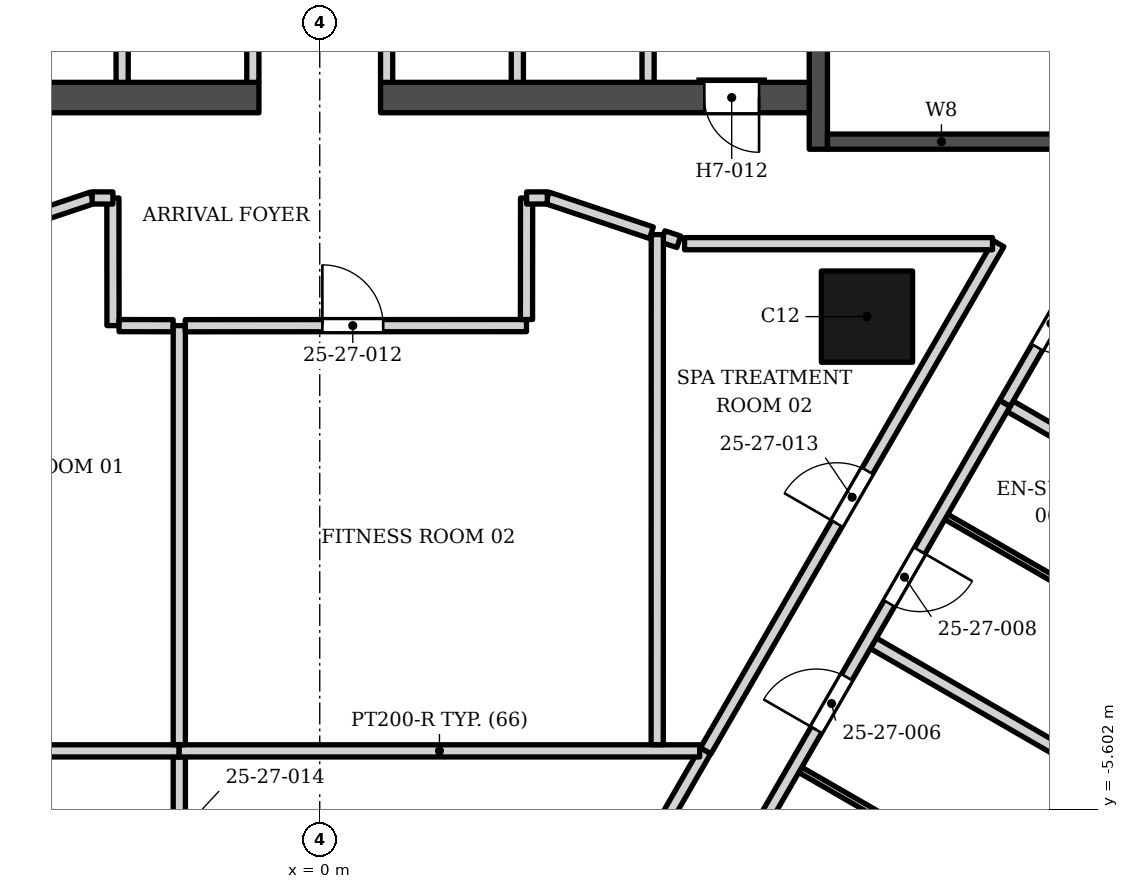
"""IFC4 building model, lengths in metres.
Left out: names, types, materials, properties, quantities, classifications, styles, units other than length and angle.
Written with IfcOpenShell. Run it as: python <this file> out.ifc"""

import sys

from ifc_helpers import new_model, si_unit, direction, frame, frame_2d, origin, origin_2d, place, context, subcontext, project, spatial, rectangle, extrude, element, fill, save


model = new_model("IFC4")
c1 = context("Model", 3, precision=1e-05, world=origin(), true_north=direction((0.0, 1.0)))
c2 = subcontext(c1, "Body", "Model", "MODEL_VIEW")
j1 = project(units=[si_unit("LENGTHUNIT", "METRE"), si_unit("PLANEANGLEUNIT", "RADIAN")], contexts=[c1])
p1 = place(None, origin())
s1 = spatial("IfcSite", under=j1, at=p1, CompositionType="ELEMENT")
p2 = place(p1, origin())
s2 = spatial("IfcBuilding", under=s1, at=p2, CompositionType="ELEMENT")
p3 = place(p2, frame((0.0, 0.0, 112.2)))
s3 = spatial("IfcBuildingStorey", under=s2, at=p3, CompositionType="ELEMENT", Elevation=112.2)
p4 = place(p3, frame((8.2, 5.253, 0.0), z_axis=(0.0, 0.0, 1.0), x_axis=(0.0, 1.0, 0.0)))
e1 = element("IfcWall", 1, at=p4, inside=s3, PredefinedType="SHEAR", context=c2, shape_type="SweptSolid", body=[
    extrude(rectangle(XDim=13.3, YDim=0.3, at=frame_2d((6.65, 0.0))), origin(), (0.0, 0.0, 1.0), 3.4),
])
p5 = place(p4, frame((7.1, 0.0, 0.0)))
e2 = element("IfcOpeningElement", 2, at=p5, cuts=e1, PredefinedType="OPENING", context=c2, shape_type="SweptSolid", body=[
    extrude(rectangle(XDim=1.4, YDim=2.1, at=frame_2d((0.7, 1.05))), frame((0.0, 0.16, 0.0), z_axis=(0.0, -1.0, 0.0), x_axis=(1.0, 0.0, 0.0)), (0.0, 0.0, 1.0), 0.32),
])
p6 = place(p4, frame((5.05, 0.0, 0.0)))
e3 = element("IfcOpeningElement", 3, at=p6, cuts=e1, PredefinedType="OPENING", context=c2, shape_type="SweptSolid", body=[
    extrude(rectangle(XDim=1.4, YDim=2.1, at=frame_2d((0.7, 1.05))), frame((0.0, 0.16, 0.0), z_axis=(0.0, -1.0, 0.0), x_axis=(1.0, 0.0, 0.0)), (0.0, 0.0, 1.0), 0.32),
])
p7 = place(p3, frame((8.35, 5.378, 0.0), z_axis=(0.0, 0.0, 1.0), x_axis=(1.0, 0.0, 0.0)))
e4 = element("IfcWall", 4, at=p7, inside=s3, PredefinedType="SHEAR", context=c2, shape_type="SweptSolid", body=[
    extrude(rectangle(XDim=3.75, YDim=0.25, at=frame_2d((1.875, 0.0))), origin(), (0.0, 0.0, 1.0), 3.4),
])
p8 = place(p3, frame((-8.05, 6.103, 0.0), z_axis=(0.0, 0.0, 1.0), x_axis=(1.0, 0.0, 0.0)))
e5 = element("IfcWall", 5, at=p8, inside=s3, PredefinedType="SHEAR", context=c2, shape_type="SweptSolid", body=[
    extrude(rectangle(XDim=7.05, YDim=0.5, at=frame_2d((3.525, 0.0))), origin(), (0.0, 0.0, 1.0), 3.4),
])
p9 = place(p8, frame((0.825, 0.0, 0.0)))
e6 = element("IfcOpeningElement", 6, at=p9, cuts=e5, PredefinedType="OPENING", context=c2, shape_type="SweptSolid", body=[
    extrude(rectangle(XDim=0.9, YDim=2.1, at=frame_2d((0.45, 1.05))), frame((0.0, 0.26, 0.0), z_axis=(0.0, -1.0, 0.0), x_axis=(1.0, 0.0, 0.0)), (0.0, 0.0, 1.0), 0.52),
])
p10 = place(p3, frame((1.0, 6.103, 0.0), z_axis=(0.0, 0.0, 1.0), x_axis=(1.0, 0.0, 0.0)))
e7 = element("IfcWall", 7, at=p10, inside=s3, PredefinedType="SHEAR", context=c2, shape_type="SweptSolid", body=[
    extrude(rectangle(XDim=7.05, YDim=0.5, at=frame_2d((3.525, 0.0))), origin(), (0.0, 0.0, 1.0), 3.4),
])
p11 = place(p10, frame((5.325, 0.0, 0.0)))
e8 = element("IfcOpeningElement", 8, at=p11, cuts=e7, PredefinedType="OPENING", context=c2, shape_type="SweptSolid", body=[
    extrude(rectangle(XDim=0.9, YDim=2.1, at=frame_2d((0.45, 1.05))), frame((0.0, 0.26, 0.0), z_axis=(0.0, -1.0, 0.0), x_axis=(1.0, 0.0, 0.0)), (0.0, 0.0, 1.0), 0.52),
])
p12 = place(p3, frame((9.0, 2.5, 0.0), z_axis=(0.0, 0.0, 1.0), x_axis=(1.0, 0.0, 0.0)))
e9 = element("IfcColumn", 9, at=p12, inside=s3, PredefinedType="COLUMN", context=c2, shape_type="SweptSolid", body=[
    extrude(rectangle(XDim=1.5, YDim=1.5, at=origin_2d()), origin(), (0.0, 0.0, 1.0), 3.4),
])
for number, where, z_axis, x_axis in (
    (10, (-3.25, 6.353, 0.0), (0.0, 0.0, 1.0), (0.0, 1.0, 0.0)),
    (11, (-1.1, 6.353, 0.0), (0.0, 0.0, 1.0), (0.0, 1.0, 0.0)),
    (12, (1.1, 6.353, 0.0), (0.0, 0.0, 1.0), (0.0, 1.0, 0.0)),
    (13, (3.25, 6.353, 0.0), (0.0, 0.0, 1.0), (0.0, 1.0, 0.0)),
    (14, (5.4, 6.353, 0.0), (0.0, 0.0, 1.0), (0.0, 1.0, 0.0)),
):
    element("IfcWall", number, at=place(p3, frame(where, z_axis=z_axis, x_axis=x_axis)), inside=s3, PredefinedType="SOLIDWALL", context=c2, shape_type="SweptSolid", body=[
        extrude(rectangle(XDim=2.5, YDim=0.2, at=frame_2d((1.25, 0.0))), origin(), (0.0, 0.0, 1.0), 3.23),
    ])
p13 = place(p3, frame((-12.882, 3.644, 0.0), z_axis=(0.0, 0.0, 1.0), x_axis=(0.500000325599, -0.866025215799, 0.0)))
e15 = element("IfcWall", 15, at=p13, inside=s3, PredefinedType="PARTITIONING", context=c2, shape_type="SweptSolid", body=[
    extrude(rectangle(XDim=25.63, YDim=0.2, at=frame_2d((12.815, 0.0))), origin(), (0.0, 0.0, 1.0), 2.384),
])
p14 = place(p13, frame((4.0, 0.0, 0.0)))
e16 = element("IfcOpeningElement", 16, at=p14, cuts=e15, PredefinedType="OPENING", context=c2, shape_type="SweptSolid", body=[
    extrude(rectangle(XDim=1.0, YDim=2.1, at=frame_2d((0.5, 1.05))), frame((0.0, 0.11, 0.0), z_axis=(0.0, -1.0, 0.0), x_axis=(1.0, 0.0, 0.0)), (0.0, 0.0, 1.0), 0.22),
])
p15 = place(p13, frame((14.95, 0.0, 0.0)))
e17 = element("IfcOpeningElement", 17, at=p15, cuts=e15, PredefinedType="OPENING", context=c2, shape_type="SweptSolid", body=[
    extrude(rectangle(XDim=1.6, YDim=2.1, at=frame_2d((0.8, 1.05))), frame((0.0, 0.11, 0.0), z_axis=(0.0, -1.0, 0.0), x_axis=(1.0, 0.0, 0.0)), (0.0, 0.0, 1.0), 0.22),
])
p16 = place(p13, frame((23.515, 0.0, 0.0)))
e18 = element("IfcOpeningElement", 18, at=p16, cuts=e15, PredefinedType="OPENING", context=c2, shape_type="SweptSolid", body=[
    extrude(rectangle(XDim=1.1, YDim=2.1, at=frame_2d((0.55, 1.05))), frame((0.0, 0.11, 0.0), z_axis=(0.0, -1.0, 0.0), x_axis=(1.0, 0.0, 0.0)), (0.0, 0.0, 1.0), 0.22),
])
p17 = place(p3, frame((-0.065, -15.751, 0.0), z_axis=(0.0, 0.0, 1.0), x_axis=(0.499524753178, 0.866299613854, 0.0)))
e19 = element("IfcWall", 19, at=p17, inside=s3, PredefinedType="PARTITIONING", context=c2, shape_type="SweptSolid", body=[
    extrude(rectangle(XDim=12.83, YDim=0.2, at=frame_2d((6.415, 0.0))), origin(), (0.0, 0.0, 1.0), 2.374),
])
p18 = place(p17, frame((7.556, 0.0, 0.0)))
e20 = element("IfcOpeningElement", 20, at=p18, cuts=e19, PredefinedType="OPENING", context=c2, shape_type="SweptSolid", body=[
    extrude(rectangle(XDim=1.0, YDim=2.1, at=frame_2d((0.5, 1.05))), frame((0.0, 0.11, 0.0), z_axis=(0.0, -1.0, 0.0), x_axis=(1.0, 0.0, 0.0)), (0.0, 0.0, 1.0), 0.22),
])
p19 = place(p3, frame((7.902, -4.952, 0.0), z_axis=(0.0, 0.0, 1.0), x_axis=(0.866339109022, -0.499456252518, 0.0)))
e21 = element("IfcWall", 21, at=p19, inside=s3, PredefinedType="PARTITIONING", context=c2, shape_type="SweptSolid", body=[
    extrude(rectangle(XDim=2.7, YDim=0.1, at=frame_2d((1.35, 0.0))), origin(), (0.0, 0.0, 1.0), 2.552),
])
p20 = place(p3, frame((-2.31, -10.667, 0.0), z_axis=(0.0, 0.0, 1.0), x_axis=(0.0, 1.0, 0.0)))
e22 = element("IfcWall", 22, at=p20, inside=s3, PredefinedType="PARTITIONING", context=c2, shape_type="SweptSolid", body=[
    extrude(rectangle(XDim=5.927, YDim=0.2, at=frame_2d((2.963, 0.0))), origin(), (0.0, 0.0, 1.0), 3.23),
])
p21 = place(p3, frame((-6.478, -4.641, 0.0), z_axis=(0.0, 0.0, 1.0), x_axis=(0.499806127846, -0.866137306994, 0.0)))
e23 = element("IfcWall", 23, at=p21, inside=s3, PredefinedType="PARTITIONING", context=c2, shape_type="SweptSolid", body=[
    extrude(rectangle(XDim=8.335, YDim=0.2, at=frame_2d((4.167, 0.0))), origin(), (0.0, 0.0, 1.0), 2.384),
])
p22 = place(p21, frame((3.716, 0.0, 0.0)))
e24 = element("IfcOpeningElement", 24, at=p22, cuts=e23, PredefinedType="OPENING", context=c2, shape_type="SweptSolid", body=[
    extrude(rectangle(XDim=0.9, YDim=2.1, at=frame_2d((0.45, 1.05))), frame((0.0, 0.11, 0.0), z_axis=(0.0, -1.0, 0.0), x_axis=(1.0, 0.0, 0.0)), (0.0, 0.0, 1.0), 0.22),
])
p23 = place(p3, frame((-6.378, -4.641, 0.0), z_axis=(0.0, 0.0, 1.0), x_axis=(1.0, 0.0, 0.0)))
e25 = element("IfcWall", 25, at=p23, inside=s3, PredefinedType="PARTITIONING", context=c2, shape_type="SweptSolid", body=[
    extrude(rectangle(XDim=4.066, YDim=0.2, at=frame_2d((2.033, 0.0))), origin(), (0.0, 0.0, 1.0), 2.384),
])
p24 = place(p3, frame((-2.311, -4.641, 0.0), z_axis=(0.0, 0.0, 1.0), x_axis=(1.0, 0.0, 0.0)))
e26 = element("IfcWall", 26, at=p24, inside=s3, PredefinedType="PARTITIONING", context=c2, shape_type="SweptSolid", body=[
    extrude(rectangle(XDim=8.56, YDim=0.2, at=frame_2d((4.28, 0.0))), origin(), (0.0, 0.0, 1.0), 2.384),
])
p25 = place(p3, frame((6.348, -4.639, 0.0), z_axis=(0.0, 0.0, 1.0), x_axis=(0.500160597015, 0.865932663198, 0.0)))
e27 = element("IfcWall", 27, at=p25, inside=s3, PredefinedType="PARTITIONING", context=c2, shape_type="SweptSolid", body=[
    extrude(rectangle(XDim=9.63, YDim=0.2, at=frame_2d((4.815, 0.0))), origin(), (0.0, 0.0, 1.0), 2.552),
])
p26 = place(p25, frame((4.315, 0.0, 0.0)))
e28 = element("IfcOpeningElement", 28, at=p26, cuts=e27, PredefinedType="OPENING", context=c2, shape_type="SweptSolid", body=[
    extrude(rectangle(XDim=1.0, YDim=2.1, at=frame_2d((0.5, 1.05))), frame((0.0, 0.11, 0.0), z_axis=(0.0, -1.0, 0.0), x_axis=(1.0, 0.0, 0.0)), (0.0, 0.0, 1.0), 0.22),
])
p27 = place(p3, frame((9.104, -2.871, 0.0), z_axis=(0.0, 0.0, 1.0), x_axis=(0.865901871826, -0.500213902613, 0.0)))
e29 = element("IfcWall", 29, at=p27, inside=s3, PredefinedType="PARTITIONING", context=c2, shape_type="SweptSolid", body=[
    extrude(rectangle(XDim=6.45, YDim=0.2, at=frame_2d((3.225, 0.0))), origin(), (0.0, 0.0, 1.0), 2.384),
])
p28 = place(p27, frame((4.25, 0.0, 0.0)))
e30 = element("IfcOpeningElement", 30, at=p28, cuts=e29, PredefinedType="OPENING", context=c2, shape_type="SweptSolid", body=[
    extrude(rectangle(XDim=0.9, YDim=2.1, at=frame_2d((0.45, 1.05))), frame((0.0, 0.11, 0.0), z_axis=(0.0, -1.0, 0.0), x_axis=(1.0, 0.0, 0.0)), (0.0, 0.0, 1.0), 0.22),
])
p29 = place(p3, frame((10.303, -0.792, 0.0), z_axis=(0.0, 0.0, 1.0), x_axis=(0.86571095196, -0.500544251447, 0.0)))
e31 = element("IfcWall", 31, at=p29, inside=s3, PredefinedType="PARTITIONING", context=c2, shape_type="SweptSolid", body=[
    extrude(rectangle(XDim=2.7, YDim=0.1, at=frame_2d((1.35, 0.0))), origin(), (0.0, 0.0, 1.0), 3.23),
])
p30 = place(p3, frame((11.355, 1.025, 0.0), z_axis=(0.0, 0.0, 1.0), x_axis=(0.865748417306, -0.500479448062, 0.0)))
e32 = element("IfcWall", 32, at=p30, inside=s3, PredefinedType="PARTITIONING", context=c2, shape_type="SweptSolid", body=[
    extrude(rectangle(XDim=6.448, YDim=0.2, at=frame_2d((3.224, 0.0))), origin(), (0.0, 0.0, 1.0), 2.384),
])
p31 = place(p3, frame((0.018, -18.412, 0.0), z_axis=(0.0, 0.0, 1.0), x_axis=(0.49999953585, 0.866025671762, 0.0)))
e33 = element("IfcWall", 33, at=p31, inside=s3, PredefinedType="PARTITIONING", context=c2, shape_type="SweptSolid", body=[
    extrude(rectangle(XDim=22.5, YDim=0.2, at=frame_2d((11.25, 0.0))), origin(), (0.0, 0.0, 1.0), 2.374),
])
p32 = place(p31, frame((4.0, 0.0, 0.0)))
e34 = element("IfcOpeningElement", 34, at=p32, cuts=e33, PredefinedType="OPENING", context=c2, shape_type="SweptSolid", body=[
    extrude(rectangle(XDim=1.0, YDim=2.1, at=frame_2d((0.5, 1.05))), frame((0.0, 0.11, 0.0), z_axis=(0.0, -1.0, 0.0), x_axis=(1.0, 0.0, 0.0)), (0.0, 0.0, 1.0), 0.22),
])
p33 = place(p31, frame((9.5, 0.0, 0.0)))
e35 = element("IfcOpeningElement", 35, at=p33, cuts=e33, PredefinedType="OPENING", context=c2, shape_type="SweptSolid", body=[
    extrude(rectangle(XDim=1.1, YDim=2.1, at=frame_2d((0.55, 1.05))), frame((0.0, 0.11, 0.0), z_axis=(0.0, -1.0, 0.0), x_axis=(1.0, 0.0, 0.0)), (0.0, 0.0, 1.0), 0.22),
])
p34 = place(p31, frame((16.3, 0.0, 0.0)))
e36 = element("IfcOpeningElement", 36, at=p34, cuts=e33, PredefinedType="OPENING", context=c2, shape_type="SweptSolid", body=[
    extrude(rectangle(XDim=1.0, YDim=2.1, at=frame_2d((0.5, 1.05))), frame((0.0, 0.11, 0.0), z_axis=(0.0, -1.0, 0.0), x_axis=(1.0, 0.0, 0.0)), (0.0, 0.0, 1.0), 0.22),
])
p35 = place(p31, frame((18.7, 0.0, 0.0)))
e37 = element("IfcOpeningElement", 37, at=p35, cuts=e33, PredefinedType="OPENING", context=c2, shape_type="SweptSolid", body=[
    extrude(rectangle(XDim=1.0, YDim=2.1, at=frame_2d((0.5, 1.05))), frame((0.0, 0.11, 0.0), z_axis=(0.0, -1.0, 0.0), x_axis=(1.0, 0.0, 0.0)), (0.0, 0.0, 1.0), 0.22),
])
p36 = place(p3, frame((-3.402, 4.451, 0.0), z_axis=(0.0, 0.0, 1.0), x_axis=(0.000930881607, -0.99999956673, 0.0)))
e38 = element("IfcWall", 38, at=p36, inside=s3, PredefinedType="PARTITIONING", context=c2, shape_type="SweptSolid", body=[
    extrude(rectangle(XDim=2.098, YDim=0.2, at=frame_2d((1.049, 0.0))), origin(), (0.0, 0.0, 1.0), 3.23),
])
p37 = place(p3, frame((-3.3, 2.352, 0.0), z_axis=(0.0, 0.0, 1.0), x_axis=(0.999998150893, -0.001923073367, 0.0)))
e39 = element("IfcWall", 39, at=p37, inside=s3, PredefinedType="PARTITIONING", context=c2, shape_type="SweptSolid", body=[
    extrude(rectangle(XDim=0.889, YDim=0.2, at=frame_2d((0.444, 0.0))), origin(), (0.0, 0.0, 1.0), 3.23),
])
p38 = place(p3, frame((-2.31, -4.539, 0.0), z_axis=(0.0, 0.0, 1.0), x_axis=(0.0, 1.0, 0.0)))
e40 = element("IfcWall", 40, at=p38, inside=s3, PredefinedType="PARTITIONING", context=c2, shape_type="SweptSolid", body=[
    extrude(rectangle(XDim=6.892, YDim=0.2, at=frame_2d((3.446, 0.0))), origin(), (0.0, 0.0, 1.0), 3.23),
])
p39 = place(p3, frame((-2.211, 2.351, 0.0), z_axis=(0.0, 0.0, 1.0), x_axis=(0.999999953622, 0.00030455968, 0.0)))
e41 = element("IfcWall", 41, at=p39, inside=s3, PredefinedType="PARTITIONING", context=c2, shape_type="SweptSolid", body=[
    extrude(rectangle(XDim=5.611, YDim=0.2, at=frame_2d((2.806, 0.0))), origin(), (0.0, 0.0, 1.0), 3.23),
])
p40 = place(p39, frame((2.255, 0.0, 0.0)))
e42 = element("IfcOpeningElement", 42, at=p40, cuts=e41, PredefinedType="OPENING", context=c2, shape_type="SweptSolid", body=[
    extrude(rectangle(XDim=1.0, YDim=2.1, at=frame_2d((0.5, 1.05))), frame((0.0, 0.11, 0.0), z_axis=(0.0, -1.0, 0.0), x_axis=(1.0, 0.0, 0.0)), (0.0, 0.0, 1.0), 0.22),
])
p41 = place(p3, frame((6.0, 3.7, 0.0), z_axis=(0.0, 0.0, 1.0), x_axis=(1.0, 0.0, 0.0)))
e43 = element("IfcWall", 43, at=p41, inside=s3, PredefinedType="PARTITIONING", context=c2, shape_type="SweptSolid", body=[
    extrude(rectangle(XDim=5.065, YDim=0.2, at=frame_2d((2.532, 0.0))), origin(), (0.0, 0.0, 1.0), 2.832),
])
p42 = place(p3, frame((11.269, 1.075, 0.0), z_axis=(0.0, 0.0, 1.0), x_axis=(0.499554983499, 0.866282181775, 0.0)))
e44 = element("IfcWall", 44, at=p42, inside=s3, PredefinedType="PARTITIONING", context=c2, shape_type="SweptSolid", body=[
    extrude(rectangle(XDim=3.029, YDim=0.2, at=frame_2d((1.515, 0.0))), origin(), (0.0, 0.0, 1.0), 3.23),
])
p43 = place(p42, frame((1.064, 0.0, 0.0)))
e45 = element("IfcOpeningElement", 45, at=p43, cuts=e44, PredefinedType="OPENING", context=c2, shape_type="SweptSolid", body=[
    extrude(rectangle(XDim=0.9, YDim=2.1, at=frame_2d((0.45, 1.05))), frame((0.0, 0.11, 0.0), z_axis=(0.0, -1.0, 0.0), x_axis=(1.0, 0.0, 0.0)), (0.0, 0.0, 1.0), 0.22),
])
p44 = place(p3, frame((5.645, 3.817, 0.0), z_axis=(0.0, 0.0, 1.0), x_axis=(0.950012851822, -0.312210796374, 0.0)))
e46 = element("IfcWall", 46, at=p44, inside=s3, PredefinedType="PARTITIONING", context=c2, shape_type="SweptSolid", body=[
    extrude(rectangle(XDim=0.274, YDim=0.2, at=frame_2d((0.137, 0.0))), origin(), (0.0, 0.0, 1.0), 3.23),
])
p45 = place(p3, frame((5.55, -4.539, 0.0), z_axis=(0.0, 0.0, 1.0), x_axis=(0.000203731187, 0.999999979247, 0.0)))
e47 = element("IfcWall", 47, at=p45, inside=s3, PredefinedType="PARTITIONING", context=c2, shape_type="SweptSolid", body=[
    extrude(rectangle(XDim=8.388, YDim=0.2, at=frame_2d((4.194, 0.0))), origin(), (0.0, 0.0, 1.0), 3.23),
])
p46 = place(p3, frame((3.742, 4.452, 0.0), z_axis=(0.0, 0.0, 1.0), x_axis=(0.948371897829, -0.317160437962, 0.0)))
e48 = element("IfcWall", 48, at=p46, inside=s3, PredefinedType="PARTITIONING", context=c2, shape_type="SweptSolid", body=[
    extrude(rectangle(XDim=1.806, YDim=0.2, at=frame_2d((0.903, 0.0))), origin(), (0.0, 0.0, 1.0), 2.384),
])
p47 = place(p3, frame((-5.905, 3.731, 0.0), z_axis=(0.0, 0.0, 1.0), x_axis=(0.948683298051, 0.316227766017, 0.0)))
e49 = element("IfcWall", 49, at=p47, inside=s3, PredefinedType="PARTITIONING", context=c2, shape_type="SweptSolid", body=[
    extrude(rectangle(XDim=2.28, YDim=0.2, at=frame_2d((1.14, 0.0))), origin(), (0.0, 0.0, 1.0), 2.384),
])
p48 = place(p3, frame((-3.742, 4.452, 0.0), z_axis=(0.0, 0.0, 1.0), x_axis=(0.999987374295, -0.005025062182, 0.0)))
e50 = element("IfcWall", 50, at=p48, inside=s3, PredefinedType="PARTITIONING", context=c2, shape_type="SweptSolid", body=[
    extrude(rectangle(XDim=0.34, YDim=0.2, at=frame_2d((0.17, 0.0))), origin(), (0.0, 0.0, 1.0), 3.23),
])
p49 = place(p3, frame((3.4, 2.452, 0.0), z_axis=(0.0, 0.0, 1.0), x_axis=(0.000977397212, 0.999999522347, 0.0)))
e51 = element("IfcWall", 51, at=p49, inside=s3, PredefinedType="PARTITIONING", context=c2, shape_type="SweptSolid", body=[
    extrude(rectangle(XDim=1.998, YDim=0.2, at=frame_2d((0.999, 0.0))), origin(), (0.0, 0.0, 1.0), 3.23),
])
p50 = place(p3, frame((3.402, 4.451, 0.0), z_axis=(0.0, 0.0, 1.0), x_axis=(0.999987374295, 0.005025062182, 0.0)))
e52 = element("IfcWall", 52, at=p50, inside=s3, PredefinedType="PARTITIONING", context=c2, shape_type="SweptSolid", body=[
    extrude(rectangle(XDim=0.34, YDim=0.2, at=frame_2d((0.17, 0.0))), origin(), (0.0, 0.0, 1.0), 3.23),
])
p51 = place(p11, origin())
e53 = element("IfcDoor", 53, at=p51, inside=s3, OperationType="SINGLE_SWING_RIGHT", PredefinedType="DOOR", context=c2, shape_type="SweptSolid", body=[
    extrude(rectangle(XDim=0.9, YDim=2.1, at=frame_2d((0.45, 1.05))), frame((0.0, 0.025, 0.0), z_axis=(0.0, -1.0, 0.0), x_axis=(1.0, 0.0, 0.0)), (0.0, 0.0, 1.0), 0.05),
])
fill(e8, e53)
p52 = place(p34, origin())
e54 = element("IfcDoor", 54, at=p52, inside=s3, OperationType="SINGLE_SWING_LEFT", PredefinedType="DOOR", context=c2, shape_type="SweptSolid", body=[
    extrude(rectangle(XDim=1.0, YDim=2.1, at=frame_2d((0.5, 1.05))), frame((0.0, 0.025, 0.0), z_axis=(0.0, -1.0, 0.0), x_axis=(1.0, 0.0, 0.0)), (0.0, 0.0, 1.0), 0.05),
])
fill(e36, e54)
p53 = place(p35, origin())
e55 = element("IfcDoor", 55, at=p53, inside=s3, OperationType="SINGLE_SWING_RIGHT", PredefinedType="DOOR", context=c2, shape_type="SweptSolid", body=[
    extrude(rectangle(XDim=1.0, YDim=2.1, at=frame_2d((0.5, 1.05))), frame((0.0, 0.025, 0.0), z_axis=(0.0, -1.0, 0.0), x_axis=(1.0, 0.0, 0.0)), (0.0, 0.0, 1.0), 0.05),
])
fill(e37, e55)
p54 = place(p40, origin())
e56 = element("IfcDoor", 56, at=p54, inside=s3, OperationType="SINGLE_SWING_LEFT", PredefinedType="DOOR", context=c2, shape_type="SweptSolid", body=[
    extrude(rectangle(XDim=1.0, YDim=2.1, at=frame_2d((0.5, 1.05))), frame((0.0, 0.025, 0.0), z_axis=(0.0, -1.0, 0.0), x_axis=(1.0, 0.0, 0.0)), (0.0, 0.0, 1.0), 0.05),
])
fill(e42, e56)
p55 = place(p26, origin())
e57 = element("IfcDoor", 57, at=p55, inside=s3, OperationType="SINGLE_SWING_LEFT", PredefinedType="DOOR", context=c2, shape_type="SweptSolid", body=[
    extrude(rectangle(XDim=1.0, YDim=2.1, at=frame_2d((0.5, 1.05))), frame((0.0, 0.025, 0.0), z_axis=(0.0, -1.0, 0.0), x_axis=(1.0, 0.0, 0.0)), (0.0, 0.0, 1.0), 0.05),
])
fill(e28, e57)
p56 = place(p43, origin())
e58 = element("IfcDoor", 58, at=p56, inside=s3, OperationType="SINGLE_SWING_RIGHT", PredefinedType="DOOR", context=c2, shape_type="SweptSolid", body=[
    extrude(rectangle(XDim=0.9, YDim=2.1, at=frame_2d((0.45, 1.05))), frame((0.0, 0.025, 0.0), z_axis=(0.0, -1.0, 0.0), x_axis=(1.0, 0.0, 0.0)), (0.0, 0.0, 1.0), 0.05),
])
fill(e45, e58)
save(model, sys.argv[1])
